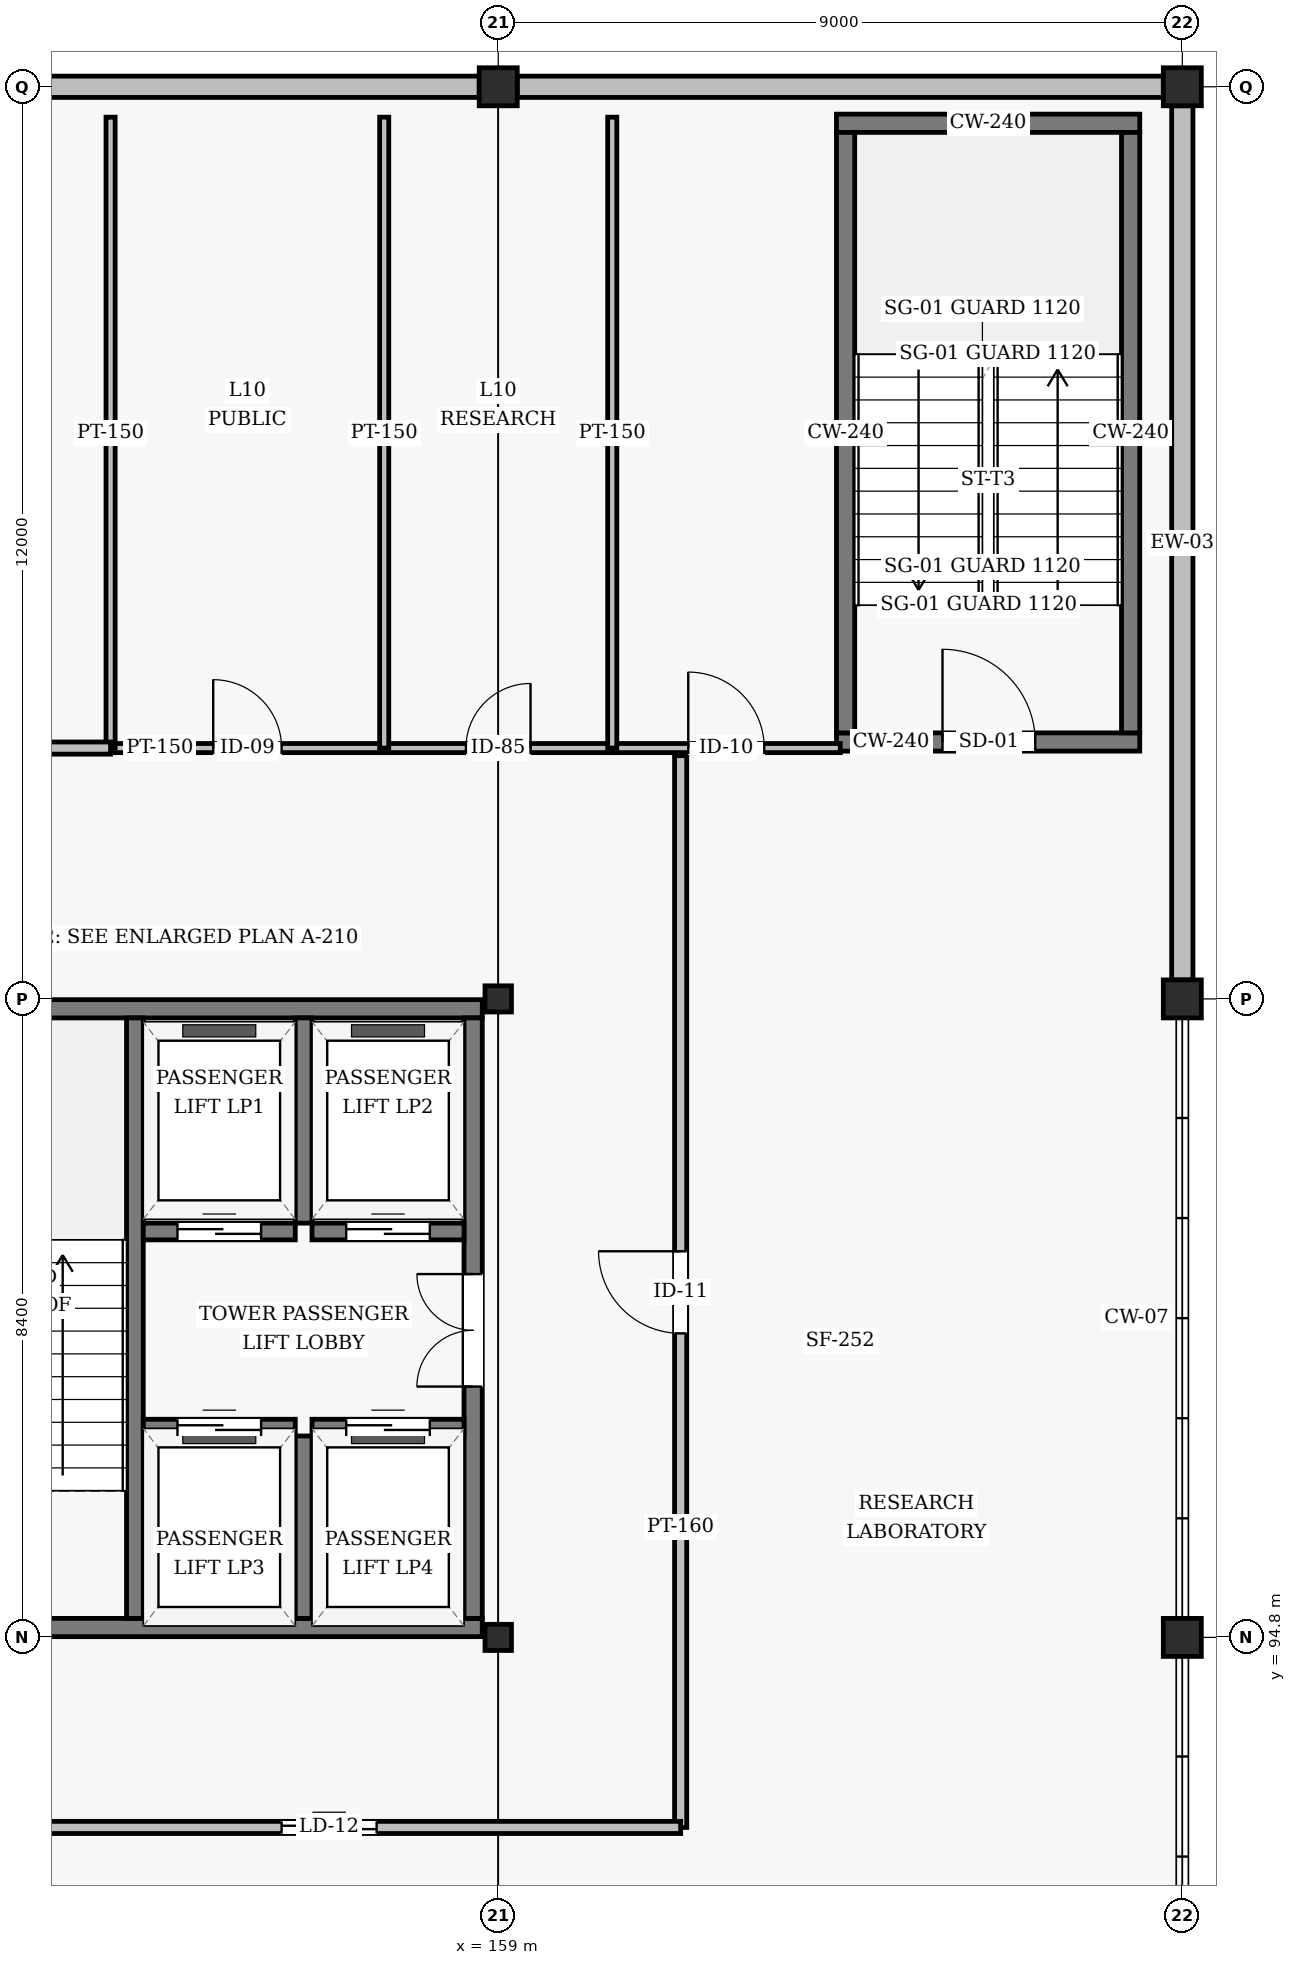
"""IFC4 building model, lengths in metres.
Left out: names, types, materials, properties, quantities, classifications, styles, units other than length and angle.
Written with IfcOpenShell. Run it as: python <this file> out.ifc"""

import sys

from ifc_helpers import new_model, si_unit, direction, frame, frame_2d, origin, origin_2d, place, context, subcontext, project, spatial, rectangle, hollow_rectangle, i_section, extrude, element, fill, save


model = new_model("IFC4")
c1 = context("Model", 3, precision=1e-05, world=origin(), true_north=direction((0.0, 1.0)))
c2 = subcontext(c1, "Body", "Model", "MODEL_VIEW")
j1 = project(units=[si_unit("LENGTHUNIT", "METRE"), si_unit("PLANEANGLEUNIT", "RADIAN")], contexts=[c1])
p1 = place(None, origin())
s1 = spatial("IfcSite", under=j1, at=p1, CompositionType="ELEMENT")
p2 = place(p1, origin())
s2 = spatial("IfcBuilding", under=s1, at=p2, CompositionType="ELEMENT")
p3 = place(p2, frame((0.0, 0.0, 39.6)))
s3 = spatial("IfcBuildingStorey", under=s2, at=p3, CompositionType="ELEMENT", Elevation=39.6)
for number, where, z_axis, x_axis in (
    (1, (159.0, 94.8, 0.0), (0.0, 0.0, 1.0), (1.0, 0.0, 0.0)),
    (2, (159.0, 103.2, 0.0), (0.0, 0.0, 1.0), (1.0, 0.0, 0.0)),
):
    element("IfcColumn", number, at=place(p3, frame(where, z_axis=z_axis, x_axis=x_axis)), inside=s3, PredefinedType="COLUMN", context=c2, shape_type="SweptSolid", body=[
        extrude(i_section(OverallWidth=0.348, OverallDepth=0.344, WebThickness=0.01, FlangeThickness=0.016, FilletRadius=0.02, at=origin_2d()), origin(), (0.0, 0.0, 1.0), 3.6),
    ])
for number, where, z_axis, x_axis in (
    (3, (159.0, 115.2, 0.0), (0.0, 0.0, 1.0), (1.0, 0.0, 0.0)),
    (4, (168.0, 94.8, 0.0), (0.0, 0.0, 1.0), (1.0, 0.0, 0.0)),
    (5, (168.0, 103.2, 0.0), (0.0, 0.0, 1.0), (1.0, 0.0, 0.0)),
    (6, (168.0, 115.2, 0.0), (0.0, 0.0, 1.0), (1.0, 0.0, 0.0)),
):
    element("IfcColumn", number, at=place(p3, frame(where, z_axis=z_axis, x_axis=x_axis)), inside=s3, PredefinedType="COLUMN", context=c2, shape_type="SweptSolid", body=[
        extrude(hollow_rectangle(XDim=0.5, YDim=0.5, WallThickness=0.02, InnerFilletRadius=0.02, OuterFilletRadius=0.04, at=origin_2d()), origin(), (0.0, 0.0, 1.0), 3.6),
    ])
p4 = place(p3, frame((168.0, 103.45, 0.0), z_axis=(0.0, 0.0, 1.0), x_axis=(0.0, 1.0, 0.0)))
e7 = element("IfcWall", 7, at=p4, inside=s3, PredefinedType="SOLIDWALL", context=c2, shape_type="SweptSolid", body=[
    extrude(rectangle(XDim=11.5, YDim=0.28, at=frame_2d((5.75, 0.0))), origin(), (0.0, 0.0, 1.0), 2.55),
])
for number, where, z_axis, x_axis in (
    (8, (167.75, 115.2, 0.0), (0.0, 0.0, 1.0), (-1.0, 0.0, 0.0)),
    (9, (158.75, 115.2, 0.0), (0.0, 0.0, 1.0), (-1.0, 0.0, 0.0)),
):
    element("IfcWall", number, at=place(p3, frame(where, z_axis=z_axis, x_axis=x_axis)), inside=s3, PredefinedType="SOLIDWALL", context=c2, shape_type="SweptSolid", body=[
        extrude(rectangle(XDim=8.5, YDim=0.28, at=frame_2d((4.25, 0.0))), origin(), (0.0, 0.0, 1.0), 2.55),
    ])
p5 = place(p3, frame((150.02, 94.93, 0.0), z_axis=(0.0, 0.0, 1.0), x_axis=(1.0, 0.0, 0.0)))
e10 = element("IfcWall", 10, at=p5, inside=s3, PredefinedType="SHEAR", context=c2, shape_type="SweptSolid", body=[
    extrude(rectangle(XDim=8.77, YDim=0.24, at=frame_2d((4.385, 0.0))), origin(), (0.0, 0.0, 1.0), 3.342),
])
p6 = place(p5, frame((1.79, 0.0, 0.0)))
e11 = element("IfcOpeningElement", 11, at=p6, cuts=e10, PredefinedType="OPENING", context=c2, shape_type="SweptSolid", body=[
    extrude(rectangle(XDim=1.22, YDim=2.18, at=frame_2d((0.61, 1.09))), frame((0.0, 0.13, 0.0), z_axis=(0.0, -1.0, 0.0), x_axis=(1.0, 0.0, 0.0)), (0.0, 0.0, 1.0), 0.26),
])
p7 = place(p3, frame((150.02, 103.07, 0.0), z_axis=(0.0, 0.0, 1.0), x_axis=(1.0, 0.0, 0.0)))
e12 = element("IfcWall", 12, at=p7, inside=s3, PredefinedType="SHEAR", context=c2, shape_type="SweptSolid", body=[
    extrude(rectangle(XDim=8.77, YDim=0.24, at=frame_2d((4.385, 0.0))), origin(), (0.0, 0.0, 1.0), 3.342),
])
p8 = place(p3, frame((154.22, 95.05, 0.0), z_axis=(0.0, 0.0, 1.0), x_axis=(0.0, 1.0, 0.0)))
e13 = element("IfcWall", 13, at=p8, inside=s3, PredefinedType="SHEAR", context=c2, shape_type="SweptSolid", body=[
    extrude(rectangle(XDim=7.9, YDim=0.22, at=frame_2d((3.95, 0.0))), origin(), (0.0, 0.0, 1.0), 3.342),
])
p9 = place(p3, frame((158.67, 95.05, 0.0), z_axis=(0.0, 0.0, 1.0), x_axis=(0.0, 1.0, 0.0)))
e14 = element("IfcWall", 14, at=p9, inside=s3, PredefinedType="SHEAR", context=c2, shape_type="SweptSolid", body=[
    extrude(rectangle(XDim=7.9, YDim=0.24, at=frame_2d((3.95, 0.0))), origin(), (0.0, 0.0, 1.0), 3.342),
])
p10 = place(p9, frame((3.05, 0.0, 0.0)))
e15 = element("IfcOpeningElement", 15, at=p10, cuts=e14, PredefinedType="OPENING", context=c2, shape_type="SweptSolid", body=[
    extrude(rectangle(XDim=1.48, YDim=2.22, at=frame_2d((0.74, 1.11))), frame((0.0, 0.13, 0.0), z_axis=(0.0, -1.0, 0.0), x_axis=(1.0, 0.0, 0.0)), (0.0, 0.0, 1.0), 0.26),
])
p11 = place(p3, frame((156.44, 100.25, 0.0), z_axis=(0.0, 0.0, 1.0), x_axis=(0.0, 1.0, 0.0)))
e16 = element("IfcWall", 16, at=p11, inside=s3, PredefinedType="SHEAR", context=c2, shape_type="SweptSolid", body=[
    extrude(rectangle(XDim=2.7, YDim=0.22, at=frame_2d((1.35, 0.0))), origin(), (0.0, 0.0, 1.0), 3.342),
])
p12 = place(p3, frame((154.33, 100.14, 0.0), z_axis=(0.0, 0.0, 1.0), x_axis=(1.0, 0.0, 0.0)))
e17 = element("IfcWall", 17, at=p12, inside=s3, PredefinedType="SHEAR", context=c2, shape_type="SweptSolid", body=[
    extrude(rectangle(XDim=2.0, YDim=0.22, at=frame_2d((1.0, 0.0))), origin(), (0.0, 0.0, 1.0), 3.342),
])
p13 = place(p12, frame((0.45, 0.0, 0.0)))
e18 = element("IfcOpeningElement", 18, at=p13, cuts=e17, PredefinedType="OPENING", context=c2, shape_type="SweptSolid", body=[
    extrude(rectangle(XDim=1.1, YDim=2.15, at=frame_2d((0.55, 1.075))), frame((0.0, 0.12, 0.0), z_axis=(0.0, -1.0, 0.0), x_axis=(1.0, 0.0, 0.0)), (0.0, 0.0, 1.0), 0.24),
])
p14 = place(p3, frame((156.55, 100.14, 0.0), z_axis=(0.0, 0.0, 1.0), x_axis=(1.0, 0.0, 0.0)))
e19 = element("IfcWall", 19, at=p14, inside=s3, PredefinedType="SHEAR", context=c2, shape_type="SweptSolid", body=[
    extrude(rectangle(XDim=2.0, YDim=0.22, at=frame_2d((1.0, 0.0))), origin(), (0.0, 0.0, 1.0), 3.342),
])
p15 = place(p14, frame((0.45, 0.0, 0.0)))
e20 = element("IfcOpeningElement", 20, at=p15, cuts=e19, PredefinedType="OPENING", context=c2, shape_type="SweptSolid", body=[
    extrude(rectangle(XDim=1.1, YDim=2.15, at=frame_2d((0.55, 1.075))), frame((0.0, 0.12, 0.0), z_axis=(0.0, -1.0, 0.0), x_axis=(1.0, 0.0, 0.0)), (0.0, 0.0, 1.0), 0.24),
])
p16 = place(p3, frame((156.44, 95.05, 0.0), z_axis=(0.0, 0.0, 1.0), x_axis=(0.0, 1.0, 0.0)))
e21 = element("IfcWall", 21, at=p16, inside=s3, PredefinedType="SHEAR", context=c2, shape_type="SweptSolid", body=[
    extrude(rectangle(XDim=2.4, YDim=0.22, at=frame_2d((1.2, 0.0))), origin(), (0.0, 0.0, 1.0), 3.342),
])
p17 = place(p3, frame((154.33, 97.56, 0.0), z_axis=(0.0, 0.0, 1.0), x_axis=(1.0, 0.0, 0.0)))
e22 = element("IfcWall", 22, at=p17, inside=s3, PredefinedType="SHEAR", context=c2, shape_type="SweptSolid", body=[
    extrude(rectangle(XDim=2.0, YDim=0.22, at=frame_2d((1.0, 0.0))), origin(), (0.0, 0.0, 1.0), 3.342),
])
p18 = place(p17, frame((0.45, 0.0, 0.0)))
e23 = element("IfcOpeningElement", 23, at=p18, cuts=e22, PredefinedType="OPENING", context=c2, shape_type="SweptSolid", body=[
    extrude(rectangle(XDim=1.1, YDim=2.15, at=frame_2d((0.55, 1.075))), frame((0.0, 0.12, 0.0), z_axis=(0.0, -1.0, 0.0), x_axis=(1.0, 0.0, 0.0)), (0.0, 0.0, 1.0), 0.24),
])
p19 = place(p3, frame((156.55, 97.56, 0.0), z_axis=(0.0, 0.0, 1.0), x_axis=(1.0, 0.0, 0.0)))
e24 = element("IfcWall", 24, at=p19, inside=s3, PredefinedType="SHEAR", context=c2, shape_type="SweptSolid", body=[
    extrude(rectangle(XDim=2.0, YDim=0.22, at=frame_2d((1.0, 0.0))), origin(), (0.0, 0.0, 1.0), 3.342),
])
p20 = place(p19, frame((0.45, 0.0, 0.0)))
e25 = element("IfcOpeningElement", 25, at=p20, cuts=e24, PredefinedType="OPENING", context=c2, shape_type="SweptSolid", body=[
    extrude(rectangle(XDim=1.1, YDim=2.15, at=frame_2d((0.55, 1.075))), frame((0.0, 0.12, 0.0), z_axis=(0.0, -1.0, 0.0), x_axis=(1.0, 0.0, 0.0)), (0.0, 0.0, 1.0), 0.24),
])
p21 = place(p3, frame((163.45, 106.58, 0.0), z_axis=(0.0, 0.0, 1.0), x_axis=(1.0, 0.0, 0.0)))
e26 = element("IfcWall", 26, at=p21, inside=s3, PredefinedType="SHEAR", context=c2, shape_type="SweptSolid", body=[
    extrude(rectangle(XDim=3.99, YDim=0.24, at=frame_2d((1.995, 0.0))), origin(), (0.0, 0.0, 1.0), 3.342),
])
p22 = place(p21, frame((1.395, 0.0, 0.0)))
e27 = element("IfcOpeningElement", 27, at=p22, cuts=e26, PredefinedType="OPENING", context=c2, shape_type="SweptSolid", body=[
    extrude(rectangle(XDim=1.22, YDim=2.18, at=frame_2d((0.61, 1.09))), frame((0.0, 0.13, 0.0), z_axis=(0.0, -1.0, 0.0), x_axis=(1.0, 0.0, 0.0)), (0.0, 0.0, 1.0), 0.26),
])
p23 = place(p3, frame((163.45, 114.72, 0.0), z_axis=(0.0, 0.0, 1.0), x_axis=(1.0, 0.0, 0.0)))
e28 = element("IfcWall", 28, at=p23, inside=s3, PredefinedType="SHEAR", context=c2, shape_type="SweptSolid", body=[
    extrude(rectangle(XDim=3.99, YDim=0.24, at=frame_2d((1.995, 0.0))), origin(), (0.0, 0.0, 1.0), 3.342),
])
for number, where, z_axis, x_axis in (
    (29, (163.57, 106.7, 0.0), (0.0, 0.0, 1.0), (0.0, 1.0, 0.0)),
    (30, (167.32, 106.7, 0.0), (0.0, 0.0, 1.0), (0.0, 1.0, 0.0)),
):
    element("IfcWall", number, at=place(p3, frame(where, z_axis=z_axis, x_axis=x_axis)), inside=s3, PredefinedType="SHEAR", context=c2, shape_type="SweptSolid", body=[
        extrude(rectangle(XDim=7.9, YDim=0.24, at=frame_2d((3.95, 0.0))), origin(), (0.0, 0.0, 1.0), 3.342),
    ])
p24 = place(p3, frame((153.9, 106.5, 0.0), z_axis=(0.0, 0.0, 1.0), x_axis=(1.0, 0.0, 0.0)))
e31 = element("IfcWall", 31, at=p24, inside=s3, PredefinedType="PARTITIONING", context=c2, shape_type="SweptSolid", body=[
    extrude(rectangle(XDim=3.6, YDim=0.12, at=frame_2d((1.8, 0.0))), origin(), (0.0, 0.0, 1.0), 3.342),
])
p25 = place(p24, frame((1.35, 0.0, 0.0)))
e32 = element("IfcOpeningElement", 32, at=p25, cuts=e31, PredefinedType="OPENING", context=c2, shape_type="SweptSolid", body=[
    extrude(rectangle(XDim=0.9, YDim=2.1, at=frame_2d((0.45, 1.05))), frame((0.0, 0.07, 0.0), z_axis=(0.0, -1.0, 0.0), x_axis=(1.0, 0.0, 0.0)), (0.0, 0.0, 1.0), 0.14),
])
p26 = place(p3, frame((157.5, 106.5, 0.0), z_axis=(0.0, 0.0, 1.0), x_axis=(1.0, 0.0, 0.0)))
e33 = element("IfcWall", 33, at=p26, inside=s3, PredefinedType="PARTITIONING", context=c2, shape_type="SweptSolid", body=[
    extrude(rectangle(XDim=3.0, YDim=0.12, at=frame_2d((1.5, 0.0))), origin(), (0.0, 0.0, 1.0), 2.592),
])
p27 = place(p26, frame((1.075, 0.0, 0.0)))
e34 = element("IfcOpeningElement", 34, at=p27, cuts=e33, PredefinedType="OPENING", context=c2, shape_type="SweptSolid", body=[
    extrude(rectangle(XDim=0.85, YDim=2.1, at=frame_2d((0.425, 1.05))), frame((0.0, 0.07, 0.0), z_axis=(0.0, -1.0, 0.0), x_axis=(1.0, 0.0, 0.0)), (0.0, 0.0, 1.0), 0.14),
])
p28 = place(p3, frame((160.5, 106.5, 0.0), z_axis=(0.0, 0.0, 1.0), x_axis=(1.0, 0.0, 0.0)))
e35 = element("IfcWall", 35, at=p28, inside=s3, PredefinedType="PARTITIONING", context=c2, shape_type="SweptSolid", body=[
    extrude(rectangle(XDim=3.0, YDim=0.12, at=frame_2d((1.5, 0.0))), origin(), (0.0, 0.0, 1.0), 3.342),
])
p29 = place(p28, frame((1.0, 0.0, 0.0)))
e36 = element("IfcOpeningElement", 36, at=p29, cuts=e35, PredefinedType="OPENING", context=c2, shape_type="SweptSolid", body=[
    extrude(rectangle(XDim=1.0, YDim=2.1, at=frame_2d((0.5, 1.05))), frame((0.0, 0.07, 0.0), z_axis=(0.0, -1.0, 0.0), x_axis=(1.0, 0.0, 0.0)), (0.0, 0.0, 1.0), 0.14),
])
for number, where, z_axis, x_axis in (
    (37, (153.9, 106.5, 0.0), (0.0, 0.0, 1.0), (0.0, 1.0, 0.0)),
    (38, (157.5, 106.5, 0.0), (0.0, 0.0, 1.0), (0.0, 1.0, 0.0)),
):
    element("IfcWall", number, at=place(p3, frame(where, z_axis=z_axis, x_axis=x_axis)), inside=s3, PredefinedType="PARTITIONING", context=c2, shape_type="SweptSolid", body=[
        extrude(rectangle(XDim=8.3, YDim=0.12, at=frame_2d((4.15, 0.0))), origin(), (0.0, 0.0, 1.0), 2.942),
    ])
p30 = place(p3, frame((160.5, 106.5, 0.0), z_axis=(0.0, 0.0, 1.0), x_axis=(0.0, 1.0, 0.0)))
e39 = element("IfcWall", 39, at=p30, inside=s3, PredefinedType="PARTITIONING", context=c2, shape_type="SweptSolid", body=[
    extrude(rectangle(XDim=8.3, YDim=0.12, at=frame_2d((4.15, 0.0))), origin(), (0.0, 0.0, 1.0), 3.342),
])
p31 = place(p3, frame((161.4, 92.3, 0.0), z_axis=(0.0, 0.0, 1.0), x_axis=(0.0, 1.0, 0.0)))
e40 = element("IfcWall", 40, at=p31, inside=s3, PredefinedType="PARTITIONING", context=c2, shape_type="SweptSolid", body=[
    extrude(rectangle(XDim=14.1, YDim=0.16, at=frame_2d((7.05, 0.0))), origin(), (0.0, 0.0, 1.0), 2.746),
])
p32 = place(p31, frame((6.5, 0.0, 0.0)))
e41 = element("IfcOpeningElement", 41, at=p32, cuts=e40, PredefinedType="OPENING", context=c2, shape_type="SweptSolid", body=[
    extrude(rectangle(XDim=1.08, YDim=2.08, at=frame_2d((0.54, 1.04))), frame((0.0, 0.09, 0.0), z_axis=(0.0, -1.0, 0.0), x_axis=(1.0, 0.0, 0.0)), (0.0, 0.0, 1.0), 0.18),
])
p33 = place(p3, frame((152.1, 92.3, 0.0), z_axis=(0.0, 0.0, 1.0), x_axis=(1.0, 0.0, 0.0)))
e42 = element("IfcWall", 42, at=p33, inside=s3, PredefinedType="PARTITIONING", context=c2, shape_type="SweptSolid", body=[
    extrude(rectangle(XDim=9.3, YDim=0.16, at=frame_2d((4.65, 0.0))), origin(), (0.0, 0.0, 1.0), 2.842),
])
p34 = place(p33, frame((4.05, 0.0, 0.0)))
e43 = element("IfcOpeningElement", 43, at=p34, cuts=e42, PredefinedType="OPENING", context=c2, shape_type="SweptSolid", body=[
    extrude(rectangle(XDim=1.25, YDim=2.12, at=frame_2d((0.625, 1.06))), frame((0.0, 0.09, 0.0), z_axis=(0.0, -1.0, 0.0), x_axis=(1.0, 0.0, 0.0)), (0.0, 0.0, 1.0), 0.18),
])
p35 = place(p3, frame((145.6, 106.5, 0.0), z_axis=(0.0, 0.0, 1.0), x_axis=(1.0, 0.0, 0.0)))
e44 = element("IfcWall", 44, at=p35, inside=s3, PredefinedType="PARTITIONING", context=c2, shape_type="SweptSolid", body=[
    extrude(rectangle(XDim=8.3, YDim=0.16, at=frame_2d((4.15, 0.0))), origin(), (0.0, 0.0, 1.0), 2.592),
])
p36 = place(p35, frame((3.6, 0.0, 0.0)))
e45 = element("IfcOpeningElement", 45, at=p36, cuts=e44, PredefinedType="OPENING", context=c2, shape_type="SweptSolid", body=[
    extrude(rectangle(XDim=1.08, YDim=2.08, at=frame_2d((0.54, 1.04))), frame((0.0, 0.09, 0.0), z_axis=(0.0, -1.0, 0.0), x_axis=(1.0, 0.0, 0.0)), (0.0, 0.0, 1.0), 0.18),
])
p37 = place(p10, origin())
e46 = element("IfcDoor", 46, at=p37, inside=s3, OperationType="DOUBLE_DOOR_SINGLE_SWING", PredefinedType="DOOR", context=c2, shape_type="SweptSolid", body=[
    extrude(rectangle(XDim=1.48, YDim=2.22, at=frame_2d((0.74, 1.11))), frame((0.0, 0.025, 0.0), z_axis=(0.0, -1.0, 0.0), x_axis=(1.0, 0.0, 0.0)), (0.0, 0.0, 1.0), 0.05),
])
fill(e15, e46)
p38 = place(p13, origin())
e47 = element("IfcDoor", 47, at=p38, inside=s3, OperationType="SLIDING_TO_LEFT", PredefinedType="DOOR", context=c2, shape_type="SweptSolid", body=[
    extrude(rectangle(XDim=1.1, YDim=2.15, at=frame_2d((0.55, 1.075))), frame((0.0, 0.025, 0.0), z_axis=(0.0, -1.0, 0.0), x_axis=(1.0, 0.0, 0.0)), (0.0, 0.0, 1.0), 0.05),
])
fill(e18, e47)
p39 = place(p15, origin())
e48 = element("IfcDoor", 48, at=p39, inside=s3, OperationType="SLIDING_TO_LEFT", PredefinedType="DOOR", context=c2, shape_type="SweptSolid", body=[
    extrude(rectangle(XDim=1.1, YDim=2.15, at=frame_2d((0.55, 1.075))), frame((0.0, 0.025, 0.0), z_axis=(0.0, -1.0, 0.0), x_axis=(1.0, 0.0, 0.0)), (0.0, 0.0, 1.0), 0.05),
])
fill(e20, e48)
p40 = place(p18, origin())
e49 = element("IfcDoor", 49, at=p40, inside=s3, OperationType="SLIDING_TO_LEFT", PredefinedType="DOOR", context=c2, shape_type="SweptSolid", body=[
    extrude(rectangle(XDim=1.1, YDim=2.15, at=frame_2d((0.55, 1.075))), frame((0.0, 0.025, 0.0), z_axis=(0.0, -1.0, 0.0), x_axis=(1.0, 0.0, 0.0)), (0.0, 0.0, 1.0), 0.05),
])
fill(e23, e49)
p41 = place(p20, origin())
e50 = element("IfcDoor", 50, at=p41, inside=s3, OperationType="SLIDING_TO_LEFT", PredefinedType="DOOR", context=c2, shape_type="SweptSolid", body=[
    extrude(rectangle(XDim=1.1, YDim=2.15, at=frame_2d((0.55, 1.075))), frame((0.0, 0.025, 0.0), z_axis=(0.0, -1.0, 0.0), x_axis=(1.0, 0.0, 0.0)), (0.0, 0.0, 1.0), 0.05),
])
fill(e25, e50)
p42 = place(p22, origin())
e51 = element("IfcDoor", 51, at=p42, inside=s3, OperationType="SINGLE_SWING_LEFT", PredefinedType="DOOR", context=c2, shape_type="SweptSolid", body=[
    extrude(rectangle(XDim=1.22, YDim=2.18, at=frame_2d((0.61, 1.09))), frame((0.0, 0.025, 0.0), z_axis=(0.0, -1.0, 0.0), x_axis=(1.0, 0.0, 0.0)), (0.0, 0.0, 1.0), 0.05),
])
fill(e27, e51)
p43 = place(p25, origin())
e52 = element("IfcDoor", 52, at=p43, inside=s3, OperationType="SINGLE_SWING_LEFT", PredefinedType="DOOR", context=c2, shape_type="SweptSolid", body=[
    extrude(rectangle(XDim=0.9, YDim=2.1, at=frame_2d((0.45, 1.05))), frame((0.0, 0.025, 0.0), z_axis=(0.0, -1.0, 0.0), x_axis=(1.0, 0.0, 0.0)), (0.0, 0.0, 1.0), 0.05),
])
fill(e32, e52)
p44 = place(p27, origin())
e53 = element("IfcDoor", 53, at=p44, inside=s3, OperationType="SINGLE_SWING_RIGHT", PredefinedType="DOOR", context=c2, shape_type="SweptSolid", body=[
    extrude(rectangle(XDim=0.85, YDim=2.1, at=frame_2d((0.425, 1.05))), frame((0.0, 0.025, 0.0), z_axis=(0.0, -1.0, 0.0), x_axis=(1.0, 0.0, 0.0)), (0.0, 0.0, 1.0), 0.05),
])
fill(e34, e53)
p45 = place(p29, origin())
e54 = element("IfcDoor", 54, at=p45, inside=s3, OperationType="SINGLE_SWING_LEFT", PredefinedType="DOOR", context=c2, shape_type="SweptSolid", body=[
    extrude(rectangle(XDim=1.0, YDim=2.1, at=frame_2d((0.5, 1.05))), frame((0.0, 0.025, 0.0), z_axis=(0.0, -1.0, 0.0), x_axis=(1.0, 0.0, 0.0)), (0.0, 0.0, 1.0), 0.05),
])
fill(e36, e54)
p46 = place(p32, origin())
e55 = element("IfcDoor", 55, at=p46, inside=s3, OperationType="SINGLE_SWING_RIGHT", PredefinedType="DOOR", context=c2, shape_type="SweptSolid", body=[
    extrude(rectangle(XDim=1.08, YDim=2.08, at=frame_2d((0.54, 1.04))), frame((0.0, 0.025, 0.0), z_axis=(0.0, -1.0, 0.0), x_axis=(1.0, 0.0, 0.0)), (0.0, 0.0, 1.0), 0.05),
])
fill(e41, e55)
p47 = place(p34, origin())
e56 = element("IfcDoor", 56, at=p47, inside=s3, OperationType="SINGLE_SWING_LEFT", PredefinedType="DOOR", context=c2, shape_type="SweptSolid", body=[
    extrude(rectangle(XDim=1.25, YDim=2.12, at=frame_2d((0.625, 1.06))), frame((0.0, 0.025, 0.0), z_axis=(0.0, -1.0, 0.0), x_axis=(1.0, 0.0, 0.0)), (0.0, 0.0, 1.0), 0.05),
])
fill(e43, e56)
save(model, sys.argv[1])
